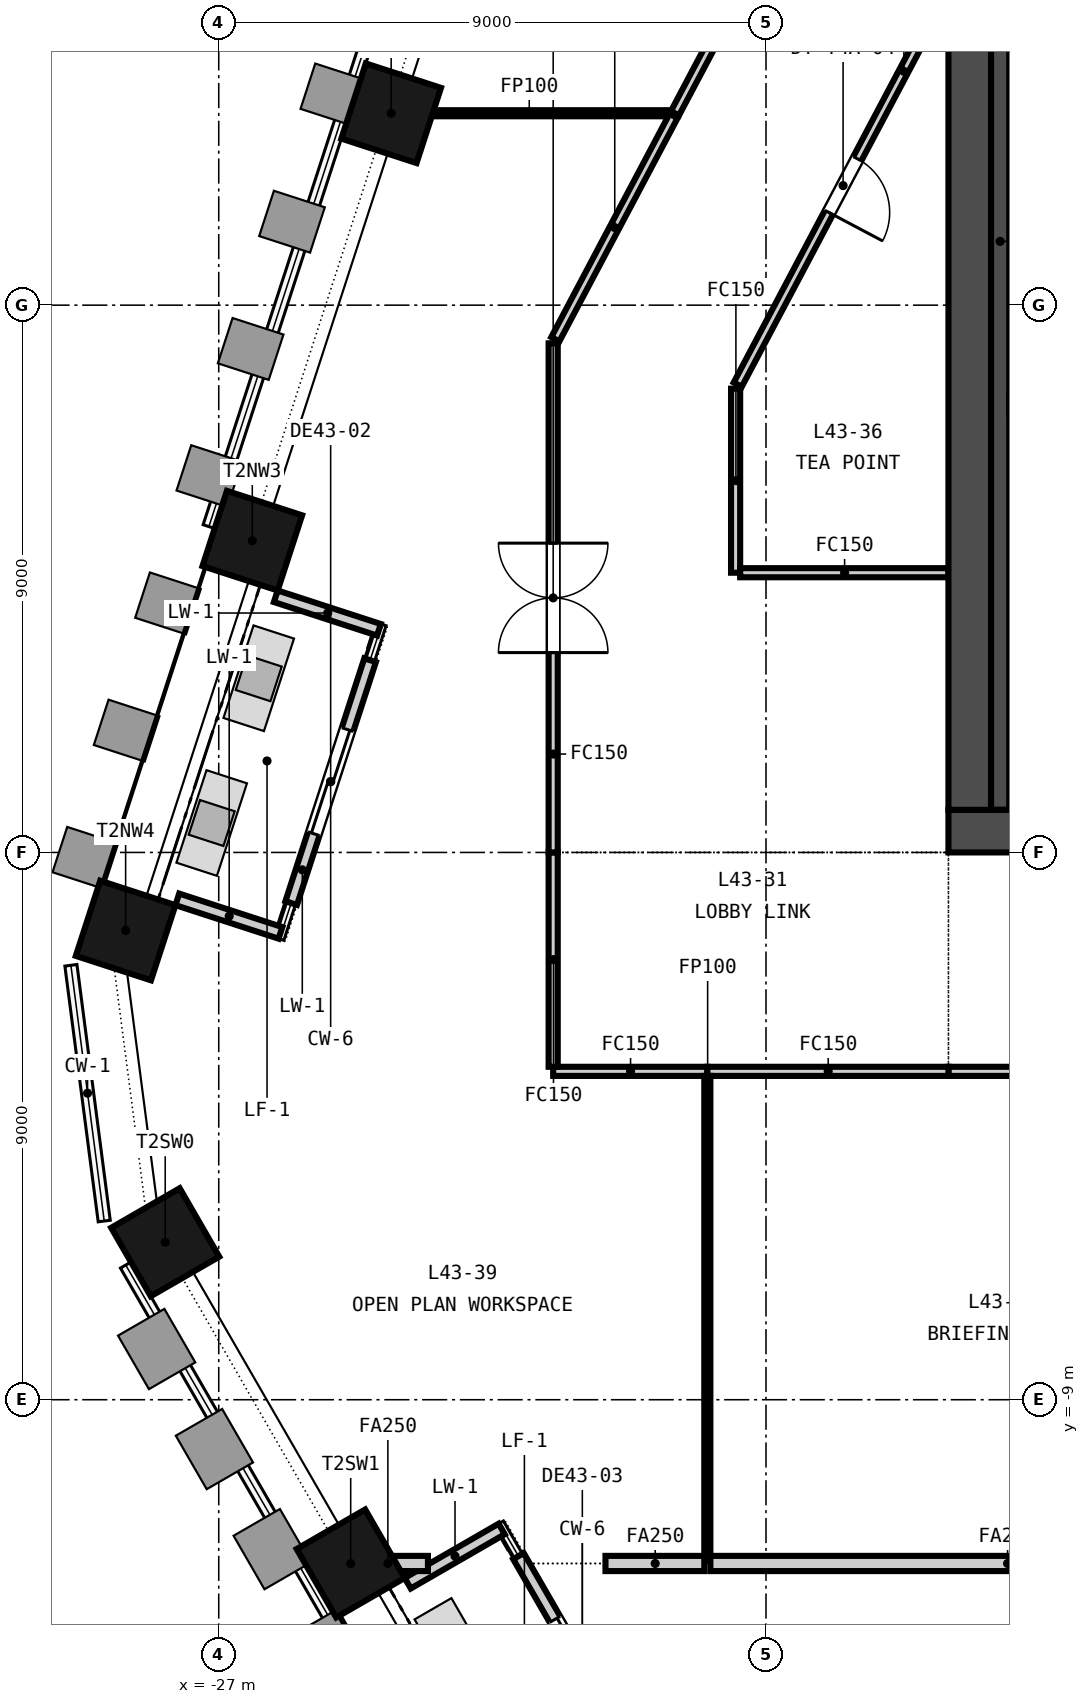
"""IFC4 building model, lengths in metres.
Left out: names, types, materials, properties, quantities, classifications, styles, units other than length and angle.
Written with IfcOpenShell. Run it as: python <this file> out.ifc"""

import sys

from ifc_helpers import new_model, si_unit, direction, frame, frame_2d, origin, origin_2d, place, context, subcontext, project, spatial, rectangle, extrude, element, fill, save


model = new_model("IFC4")
c1 = context("Model", 3, precision=1e-05, world=origin(), true_north=direction((0.0, 1.0)))
c2 = subcontext(c1, "Body", "Model", "MODEL_VIEW")
j1 = project(units=[si_unit("LENGTHUNIT", "METRE"), si_unit("PLANEANGLEUNIT", "RADIAN")], contexts=[c1])
p1 = place(None, origin())
s1 = spatial("IfcSite", under=j1, at=p1, CompositionType="ELEMENT")
p2 = place(p1, origin())
s2 = spatial("IfcBuilding", under=s1, at=p2, CompositionType="ELEMENT")
p3 = place(p2, frame((0.0, 0.0, 174.45)))
s3 = spatial("IfcBuildingStorey", under=s2, at=p3, CompositionType="ELEMENT", Elevation=174.45)
p4 = place(p3, frame((-15.0, 0.35, -0.15), z_axis=(0.0, 0.0, 1.0), x_axis=(1.0, 0.0, 0.0)))
e1 = element("IfcWall", 1, at=p4, inside=s3, PredefinedType="SOLIDWALL", context=c2, shape_type="SweptSolid", body=[
    extrude(rectangle(XDim=30.0, YDim=0.7, at=frame_2d((15.0, 0.0))), origin(), (0.0, 0.0, 1.0), 3.65),
])
p5 = place(p4, frame((5.8, 0.0, 0.15)))
e2 = element("IfcOpeningElement", 2, at=p5, cuts=e1, PredefinedType="OPENING", context=c2, shape_type="SweptSolid", body=[
    extrude(rectangle(XDim=2.4, YDim=2.4, at=frame_2d((1.2, 1.2))), frame((0.0, 0.36, 0.0), z_axis=(0.0, -1.0, 0.0), x_axis=(1.0, 0.0, 0.0)), (0.0, 0.0, 1.0), 0.72),
])
p6 = place(p4, frame((13.8, 0.0, 0.15)))
e3 = element("IfcOpeningElement", 3, at=p6, cuts=e1, PredefinedType="OPENING", context=c2, shape_type="SweptSolid", body=[
    extrude(rectangle(XDim=2.4, YDim=2.4, at=frame_2d((1.2, 1.2))), frame((0.0, 0.36, 0.0), z_axis=(0.0, -1.0, 0.0), x_axis=(1.0, 0.0, 0.0)), (0.0, 0.0, 1.0), 0.72),
])
p7 = place(p4, frame((21.8, 0.0, 0.15)))
e4 = element("IfcOpeningElement", 4, at=p7, cuts=e1, PredefinedType="OPENING", context=c2, shape_type="SweptSolid", body=[
    extrude(rectangle(XDim=2.4, YDim=2.4, at=frame_2d((1.2, 1.2))), frame((0.0, 0.36, 0.0), z_axis=(0.0, -1.0, 0.0), x_axis=(1.0, 0.0, 0.0)), (0.0, 0.0, 1.0), 0.72),
])
p8 = place(p4, frame((1.5, 0.0, 0.15)))
e5 = element("IfcOpeningElement", 5, at=p8, cuts=e1, PredefinedType="OPENING", context=c2, shape_type="SweptSolid", body=[
    extrude(rectangle(XDim=1.2, YDim=2.1, at=frame_2d((0.6, 1.05))), frame((0.0, 0.36, 0.0), z_axis=(0.0, -1.0, 0.0), x_axis=(1.0, 0.0, 0.0)), (0.0, 0.0, 1.0), 0.72),
])
p9 = place(p4, frame((27.3, 0.0, 0.15)))
e6 = element("IfcOpeningElement", 6, at=p9, cuts=e1, PredefinedType="OPENING", context=c2, shape_type="SweptSolid", body=[
    extrude(rectangle(XDim=1.2, YDim=2.1, at=frame_2d((0.6, 1.05))), frame((0.0, 0.36, 0.0), z_axis=(0.0, -1.0, 0.0), x_axis=(1.0, 0.0, 0.0)), (0.0, 0.0, 1.0), 0.72),
])
p10 = place(p3, frame((-14.65, 0.7, -0.15), z_axis=(0.0, 0.0, 1.0), x_axis=(0.0, 1.0, 0.0)))
e7 = element("IfcWall", 7, at=p10, inside=s3, PredefinedType="SOLIDWALL", context=c2, shape_type="SweptSolid", body=[
    extrude(rectangle(XDim=13.6, YDim=0.7, at=frame_2d((6.8, 0.0))), origin(), (0.0, 0.0, 1.0), 3.65),
])
for number, where, z_axis, x_axis in (
    (8, (-24.164, 12.156, -0.15), (0.0, 0.0, 1.0), (-0.309, -0.951, 0.0)),
    (9, (-26.448, 5.127, -0.15), (0.0, 0.0, 1.0), (-0.309, -0.951, 0.0)),
    (10, (-28.531, -1.284, -0.15), (0.0, 0.0, 1.0), (-0.309, -0.951, 0.0)),
    (11, (-27.88, -6.41, -0.15), (0.0, 0.0, 1.0), (0.5, -0.866, 0.0)),
    (12, (-24.83, -11.693, -0.15), (0.0, 0.0, 1.0), (0.5, -0.866, 0.0)),
):
    element("IfcColumn", number, at=place(p3, frame(where, z_axis=z_axis, x_axis=x_axis)), inside=s3, PredefinedType="COLUMN", context=c2, shape_type="SweptSolid", body=[
        extrude(rectangle(XDim=1.3, YDim=1.3, at=origin_2d()), origin(), (0.0, 0.0, 1.0), 3.65),
    ])
p11 = place(p3, frame((-24.511, 3.162, 0.0), z_axis=(0.0, 0.0, 1.0), x_axis=(-0.30901640812, -0.951056706781, 0.0)))
e13 = element("IfcWall", 13, at=p11, inside=s3, PredefinedType="SOLIDWALL", context=c2, shape_type="SweptSolid", body=[
    extrude(rectangle(XDim=4.2, YDim=0.2, at=frame_2d((2.1, 0.0))), origin(), (0.0, 0.0, 1.0), 2.751),
])
p12 = place(p11, frame((1.2, 0.0, 0.0)))
e14 = element("IfcOpeningElement", 14, at=p12, cuts=e13, PredefinedType="OPENING", context=c2, shape_type="SweptSolid", body=[
    extrude(rectangle(XDim=1.8, YDim=2.4, at=frame_2d((0.9, 1.2))), frame((0.0, 0.11, 0.0), z_axis=(0.0, -1.0, 0.0), x_axis=(1.0, 0.0, 0.0)), (0.0, 0.0, 1.0), 0.22),
])
p13 = place(p3, frame((-26.062, 4.213, 0.0), z_axis=(0.0, 0.0, 1.0), x_axis=(0.951051165303, -0.309033462549, 0.0)))
e15 = element("IfcWall", 15, at=p13, inside=s3, PredefinedType="SOLIDWALL", context=c2, shape_type="SweptSolid", body=[
    extrude(rectangle(XDim=1.784, YDim=0.2, at=frame_2d((0.892, 0.0))), origin(), (0.0, 0.0, 1.0), 3.05),
])
p14 = place(p3, frame((-27.681, -0.771, 0.0), z_axis=(0.0, 0.0, 1.0), x_axis=(0.951064233263, -0.30899324298, 0.0)))
e16 = element("IfcWall", 16, at=p14, inside=s3, PredefinedType="SOLIDWALL", context=c2, shape_type="SweptSolid", body=[
    extrude(rectangle(XDim=1.784, YDim=0.2, at=frame_2d((0.892, 0.0))), origin(), (0.0, 0.0, 1.0), 2.897),
])
p15 = place(p3, frame((-22.071, -11.573, 0.0), z_axis=(0.0, 0.0, 1.0), x_axis=(0.500027713859, -0.866009402589, 0.0)))
e17 = element("IfcWall", 17, at=p15, inside=s3, PredefinedType="SOLIDWALL", context=c2, shape_type="SweptSolid", body=[
    extrude(rectangle(XDim=4.2, YDim=0.2, at=frame_2d((2.1, 0.0))), origin(), (0.0, 0.0, 1.0), 2.751),
])
p16 = place(p15, frame((1.2, 0.0, 0.0)))
e18 = element("IfcOpeningElement", 18, at=p16, cuts=e17, PredefinedType="OPENING", context=c2, shape_type="SweptSolid", body=[
    extrude(rectangle(XDim=1.8, YDim=2.4, at=frame_2d((0.9, 1.2))), frame((0.0, 0.11, 0.0), z_axis=(0.0, -1.0, 0.0), x_axis=(1.0, 0.0, 0.0)), (0.0, 0.0, 1.0), 0.22),
])
p17 = place(p3, frame((-23.892, -12.018, 0.0), z_axis=(0.0, 0.0, 1.0), x_axis=(0.866053404088, 0.499951498915, 0.0)))
e19 = element("IfcWall", 19, at=p17, inside=s3, PredefinedType="SOLIDWALL", context=c2, shape_type="SweptSolid", body=[
    extrude(rectangle(XDim=1.784, YDim=0.2, at=frame_2d((0.892, 0.0))), origin(), (0.0, 0.0, 1.0), 3.05),
])
p18 = place(p3, frame((-14.15, 0.7, 0.0), z_axis=(0.0, 0.0, 1.0), x_axis=(0.0, 1.0, 0.0)))
e20 = element("IfcWall", 20, at=p18, inside=s3, PredefinedType="SOLIDWALL", context=c2, shape_type="SweptSolid", body=[
    extrude(rectangle(XDim=13.6, YDim=0.3, at=frame_2d((6.8, 0.0))), origin(), (0.0, 0.0, 1.0), 3.5),
])
p19 = place(p3, frame((9.15, -3.6, 0.0), z_axis=(0.0, 0.0, 1.0), x_axis=(-1.0, 0.0, 0.0)))
e21 = element("IfcWall", 21, at=p19, inside=s3, PredefinedType="PARTITIONING", context=c2, shape_type="SweptSolid", body=[
    extrude(rectangle(XDim=24.15, YDim=0.15, at=frame_2d((12.075, 0.0))), origin(), (0.0, 0.0, 1.0), 2.741),
])
p20 = place(p19, frame((11.175, 0.0, 0.0)))
e22 = element("IfcOpeningElement", 22, at=p20, cuts=e21, PredefinedType="OPENING", context=c2, shape_type="SweptSolid", body=[
    extrude(rectangle(XDim=1.8, YDim=2.1, at=frame_2d((0.9, 1.05))), frame((0.0, 0.085, 0.0), z_axis=(0.0, -1.0, 0.0), x_axis=(1.0, 0.0, 0.0)), (0.0, 0.0, 1.0), 0.17),
])
p21 = place(p3, frame((-18.965, -3.6, 0.0), z_axis=(0.0, 0.0, 1.0), x_axis=(-1.0, 0.0, 0.0)))
e23 = element("IfcWall", 23, at=p21, inside=s3, PredefinedType="PARTITIONING", context=c2, shape_type="SweptSolid", body=[
    extrude(rectangle(XDim=2.535, YDim=0.15, at=frame_2d((1.268, 0.0))), origin(), (0.0, 0.0, 1.0), 2.741),
])
p22 = place(p3, frame((-15.0, -3.6, 0.0), z_axis=(0.0, 0.0, 1.0), x_axis=(-1.0, 0.0, 0.0)))
e24 = element("IfcWall", 24, at=p22, inside=s3, PredefinedType="PARTITIONING", context=c2, shape_type="SweptSolid", body=[
    extrude(rectangle(XDim=3.965, YDim=0.15, at=frame_2d((1.982, 0.0))), origin(), (0.0, 0.0, 1.0), 2.741),
])
p23 = place(p3, frame((-18.5, 7.627, 0.0), z_axis=(0.0, 0.0, 1.0), x_axis=(0.0, -1.0, 0.0)))
e25 = element("IfcWall", 25, at=p23, inside=s3, PredefinedType="PARTITIONING", context=c2, shape_type="SweptSolid", body=[
    extrude(rectangle(XDim=3.027, YDim=0.15, at=frame_2d((1.513, 0.0))), origin(), (0.0, 0.0, 1.0), 2.741),
])
p24 = place(p3, frame((-15.0, 14.239, 0.0), z_axis=(0.0, 0.0, 1.0), x_axis=(-0.467834708812, -0.88381597928, 0.0)))
e26 = element("IfcWall", 26, at=p24, inside=s3, PredefinedType="PARTITIONING", context=c2, shape_type="SweptSolid", body=[
    extrude(rectangle(XDim=7.406, YDim=0.15, at=frame_2d((3.703, 0.0))), origin(), (0.0, 0.0, 1.0), 2.741),
])
p25 = place(p24, frame((3.203, 0.0, 0.0)))
e27 = element("IfcOpeningElement", 27, at=p25, cuts=e26, PredefinedType="OPENING", context=c2, shape_type="SweptSolid", body=[
    extrude(rectangle(XDim=1.0, YDim=2.1, at=frame_2d((0.5, 1.05))), frame((0.0, 0.085, 0.0), z_axis=(0.0, -1.0, 0.0), x_axis=(1.0, 0.0, 0.0)), (0.0, 0.0, 1.0), 0.17),
])
p26 = place(p3, frame((-19.497, 12.156, 0.0), z_axis=(0.0, 0.0, 1.0), x_axis=(0.467901291368, 0.883780731593, 0.0)))
e28 = element("IfcWall", 28, at=p26, inside=s3, PredefinedType="PARTITIONING", context=c2, shape_type="SweptSolid", body=[
    extrude(rectangle(XDim=6.613, YDim=0.15, at=frame_2d((3.306, 0.0))), origin(), (0.0, 0.0, 1.0), 2.741),
])
p27 = place(p26, frame((2.806, 0.0, 0.0)))
e29 = element("IfcOpeningElement", 29, at=p27, cuts=e28, PredefinedType="OPENING", context=c2, shape_type="SweptSolid", body=[
    extrude(rectangle(XDim=1.0, YDim=2.1, at=frame_2d((0.5, 1.05))), frame((0.0, 0.085, 0.0), z_axis=(0.0, -1.0, 0.0), x_axis=(1.0, 0.0, 0.0)), (0.0, 0.0, 1.0), 0.17),
])
p28 = place(p3, frame((-24.217, 12.156, 0.0), z_axis=(0.0, 0.0, 1.0), x_axis=(1.0, 0.0, 0.0)))
e30 = element("IfcWall", 30, at=p28, inside=s3, PredefinedType="PARTITIONING", context=c2, shape_type="SweptSolid", body=[
    extrude(rectangle(XDim=4.637, YDim=0.1, at=frame_2d((2.318, 0.0))), origin(), (0.0, 0.0, 1.0), 2.741),
])
p29 = place(p3, frame((-18.425, 4.6, 0.0), z_axis=(0.0, 0.0, 1.0), x_axis=(1.0, 0.0, 0.0)))
e31 = element("IfcWall", 31, at=p29, inside=s3, PredefinedType="PARTITIONING", context=c2, shape_type="SweptSolid", body=[
    extrude(rectangle(XDim=3.425, YDim=0.15, at=frame_2d((1.712, 0.0))), origin(), (0.0, 0.0, 1.0), 2.741),
])
p30 = place(p3, frame((-21.5, -3.525, 0.0), z_axis=(0.0, 0.0, 1.0), x_axis=(0.0, 1.0, 0.0)))
e32 = element("IfcWall", 32, at=p30, inside=s3, PredefinedType="PARTITIONING", context=c2, shape_type="SweptSolid", body=[
    extrude(rectangle(XDim=3.525, YDim=0.15, at=frame_2d((1.762, 0.0))), origin(), (0.0, 0.0, 1.0), 2.741),
])
p31 = place(p3, frame((-21.5, 0.0, 0.0), z_axis=(0.0, 0.0, 1.0), x_axis=(0.0, 1.0, 0.0)))
e33 = element("IfcWall", 33, at=p31, inside=s3, PredefinedType="PARTITIONING", context=c2, shape_type="SweptSolid", body=[
    extrude(rectangle(XDim=8.373, YDim=0.15, at=frame_2d((4.187, 0.0))), origin(), (0.0, 0.0, 1.0), 2.741),
])
p32 = place(p31, frame((3.287, 0.0, 0.0)))
e34 = element("IfcOpeningElement", 34, at=p32, cuts=e33, PredefinedType="OPENING", context=c2, shape_type="SweptSolid", body=[
    extrude(rectangle(XDim=1.8, YDim=2.1, at=frame_2d((0.9, 1.05))), frame((0.0, 0.085, 0.0), z_axis=(0.0, -1.0, 0.0), x_axis=(1.0, 0.0, 0.0)), (0.0, 0.0, 1.0), 0.17),
])
p33 = place(p3, frame((-21.465, 8.439, 0.0), z_axis=(0.0, 0.0, 1.0), x_axis=(0.467890419772, 0.883786487272, 0.0)))
e35 = element("IfcWall", 35, at=p33, inside=s3, PredefinedType="PARTITIONING", context=c2, shape_type="SweptSolid", body=[
    extrude(rectangle(XDim=4.156, YDim=0.15, at=frame_2d((2.078, 0.0))), origin(), (0.0, 0.0, 1.0), 2.741),
])
p34 = place(p3, frame((-18.965, -11.618, 0.0), z_axis=(0.0, 0.0, 1.0), x_axis=(0.0, 1.0, 0.0)))
e36 = element("IfcWall", 36, at=p34, inside=s3, PredefinedType="PARTITIONING", context=c2, shape_type="SweptSolid", body=[
    extrude(rectangle(XDim=7.943, YDim=0.1, at=frame_2d((3.971, 0.0))), origin(), (0.0, 0.0, 1.0), 2.741),
])
p35 = place(p3, frame((-24.888, -11.693, 0.0), z_axis=(0.0, 0.0, 1.0), x_axis=(1.0, 0.0, 0.0)))
e37 = element("IfcWall", 37, at=p35, inside=s3, PredefinedType="PARTITIONING", context=c2, shape_type="SweptSolid", body=[
    extrude(rectangle(XDim=1.328, YDim=0.25, at=frame_2d((0.664, 0.0))), origin(), (0.0, 0.0, 1.0), 2.741),
])
p36 = place(p3, frame((-20.64, -11.693, 0.0), z_axis=(0.0, 0.0, 1.0), x_axis=(1.0, 0.0, 0.0)))
e38 = element("IfcWall", 38, at=p36, inside=s3, PredefinedType="PARTITIONING", context=c2, shape_type="SweptSolid", body=[
    extrude(rectangle(XDim=1.625, YDim=0.25, at=frame_2d((0.812, 0.0))), origin(), (0.0, 0.0, 1.0), 2.741),
])
p37 = place(p3, frame((-18.915, -11.693, 0.0), z_axis=(0.0, 0.0, 1.0), x_axis=(1.0, 0.0, 0.0)))
e39 = element("IfcWall", 39, at=p37, inside=s3, PredefinedType="PARTITIONING", context=c2, shape_type="SweptSolid", body=[
    extrude(rectangle(XDim=9.765, YDim=0.25, at=frame_2d((4.883, 0.0))), origin(), (0.0, 0.0, 1.0), 2.741),
])
p38 = place(p12, origin())
e40 = element("IfcDoor", 40, at=p38, inside=s3, OperationType="SINGLE_SWING_LEFT", PredefinedType="DOOR", context=c2, shape_type="SweptSolid", body=[
    extrude(rectangle(XDim=1.8, YDim=2.4, at=frame_2d((0.9, 1.2))), frame((0.0, 0.025, 0.0), z_axis=(0.0, -1.0, 0.0), x_axis=(1.0, 0.0, 0.0)), (0.0, 0.0, 1.0), 0.05),
])
fill(e14, e40)
p39 = place(p16, origin())
e41 = element("IfcDoor", 41, at=p39, inside=s3, OperationType="SINGLE_SWING_LEFT", PredefinedType="DOOR", context=c2, shape_type="SweptSolid", body=[
    extrude(rectangle(XDim=1.8, YDim=2.4, at=frame_2d((0.9, 1.2))), frame((0.0, 0.025, 0.0), z_axis=(0.0, -1.0, 0.0), x_axis=(1.0, 0.0, 0.0)), (0.0, 0.0, 1.0), 0.05),
])
fill(e18, e41)
p40 = place(p25, origin())
e42 = element("IfcDoor", 42, at=p40, inside=s3, OperationType="SINGLE_SWING_RIGHT", PredefinedType="DOOR", context=c2, shape_type="SweptSolid", body=[
    extrude(rectangle(XDim=1.0, YDim=2.1, at=frame_2d((0.5, 1.05))), frame((0.0, 0.025, 0.0), z_axis=(0.0, -1.0, 0.0), x_axis=(1.0, 0.0, 0.0)), (0.0, 0.0, 1.0), 0.05),
])
fill(e27, e42)
p41 = place(p32, origin())
e43 = element("IfcDoor", 43, at=p41, inside=s3, OperationType="DOUBLE_DOOR_DOUBLE_SWING", PredefinedType="DOOR", context=c2, shape_type="SweptSolid", body=[
    extrude(rectangle(XDim=1.8, YDim=2.1, at=frame_2d((0.9, 1.05))), frame((0.0, 0.025, 0.0), z_axis=(0.0, -1.0, 0.0), x_axis=(1.0, 0.0, 0.0)), (0.0, 0.0, 1.0), 0.05),
])
fill(e34, e43)
save(model, sys.argv[1])
